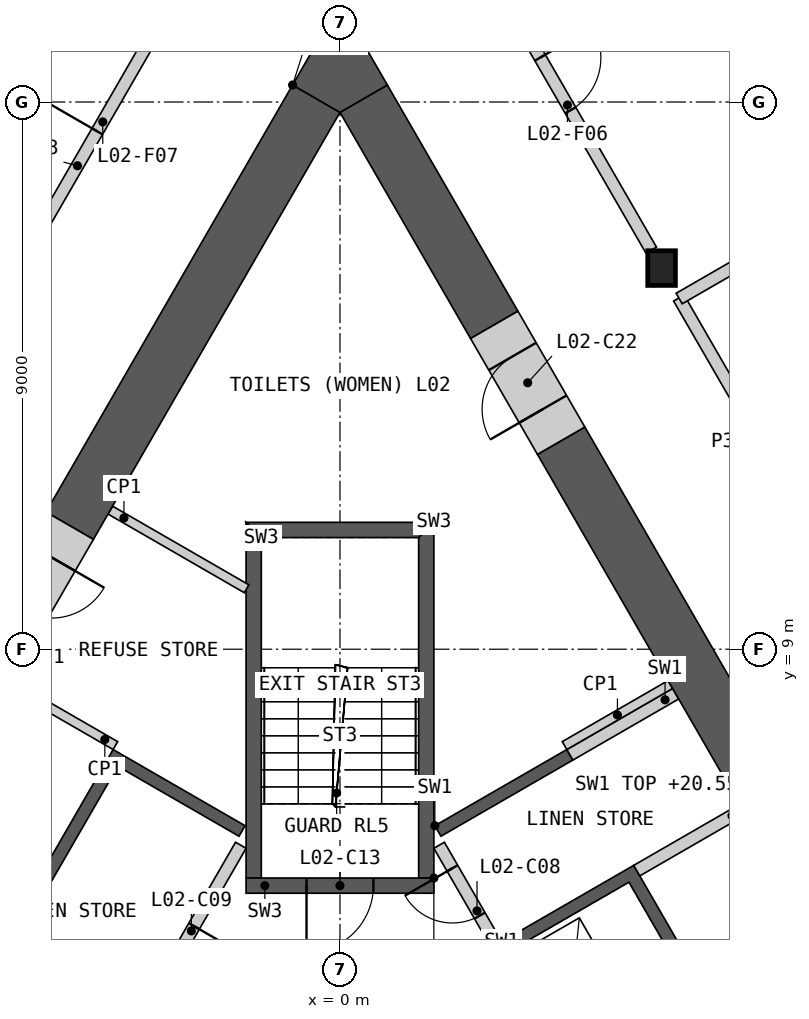
"""IFC4 building model, lengths in metres.
Left out: names, types, materials, properties, quantities, classifications, styles, units other than length and angle.
Written with IfcOpenShell. Run it as: python <this file> out.ifc"""

import sys

from ifc_helpers import new_model, si_unit, direction, frame, frame_2d, origin, origin_2d, place, context, subcontext, project, spatial, polyline, rectangle, i_section, outline, extrude, element, fill, save


model = new_model("IFC4")
c1 = context("Model", 3, precision=1e-05, world=origin(), true_north=direction((0.0, 1.0)))
c2 = subcontext(c1, "Body", "Model", "MODEL_VIEW")
j1 = project(units=[si_unit("LENGTHUNIT", "METRE"), si_unit("PLANEANGLEUNIT", "RADIAN")], contexts=[c1])
p1 = place(None, origin())
s1 = spatial("IfcSite", under=j1, at=p1, CompositionType="ELEMENT")
p2 = place(p1, origin())
s2 = spatial("IfcBuilding", under=s1, at=p2, CompositionType="ELEMENT")
p3 = place(p2, frame((0.0, 0.0, 15.5)))
s3 = spatial("IfcBuildingStorey", under=s2, at=p3, CompositionType="ELEMENT", Elevation=15.5)
p4 = place(p3, frame((5.289, 15.269, 0.0), z_axis=(0.0, 0.0, 1.0), x_axis=(1.0, 0.0, 0.0)))
e1 = element("IfcColumn", 1, at=p4, inside=s3, PredefinedType="COLUMN", context=c2, shape_type="SweptSolid", body=[
    extrude(i_section(OverallWidth=0.454, OverallDepth=0.57, WebThickness=0.078, FlangeThickness=0.125, at=origin_2d()), origin(), (0.0, 0.0, 1.0), 5.5),
])
p5 = place(p3, origin())
e2 = element("IfcWall", 2, at=p5, inside=s3, PredefinedType="SHEAR", context=c2, shape_type="SweptSolid", body=[
    extrude(outline(polyline([(1.561, 6.097), (3.731, 7.35), (3.831, 7.177), (1.66, 5.924), (1.561, 6.097)])), origin(), (0.0, 0.0, 1.0), 5.05),
])
p6 = place(p3, origin())
e3 = element("IfcWall", 3, at=p6, inside=s3, PredefinedType="SHEAR", context=c2, shape_type="SweptSolid", body=[
    extrude(outline(polyline([(2.66, 4.192), (4.831, 5.445), (8.231, -0.444), (6.061, -1.697), (5.96, -1.524), (7.952, -0.374), (6.952, 1.358), (4.96, 0.208), (4.861, 0.381), (6.852, 1.531), (5.852, 3.263), (3.861, 2.113), (3.76, 2.287), (5.752, 3.437), (4.752, 5.169), (2.76, 4.019), (2.66, 4.192)])), origin(), (0.0, 0.0, 1.0), 5.05),
])
p7 = place(p3, frame((5.817, -1.476, 0.0), z_axis=(0.0, 0.0, 1.0), x_axis=(-0.500002616675, 0.866023893041, 0.0)))
e4 = element("IfcWall", 4, at=p7, inside=s3, PredefinedType="SOLIDWALL", context=c2, shape_type="SweptSolid", body=[
    extrude(rectangle(XDim=8.373, YDim=0.2, at=frame_2d((4.187, 0.0))), origin(), (0.0, 0.0, 1.0), 5.05),
])
p8 = place(p7, frame((0.337, 0.0, 0.0)))
e5 = element("IfcOpeningElement", 5, at=p8, cuts=e4, PredefinedType="OPENING", context=c2, shape_type="SweptSolid", body=[
    extrude(rectangle(XDim=1.1, YDim=2.1, at=frame_2d((0.55, 1.05))), frame((0.0, 0.11, 0.0), z_axis=(0.0, -1.0, 0.0), x_axis=(1.0, 0.0, 0.0)), (0.0, 0.0, 1.0), 0.22),
])
p9 = place(p7, frame((2.537, 0.0, 0.0)))
e6 = element("IfcOpeningElement", 6, at=p9, cuts=e4, PredefinedType="OPENING", context=c2, shape_type="SweptSolid", body=[
    extrude(rectangle(XDim=1.1, YDim=2.1, at=frame_2d((0.55, 1.05))), frame((0.0, 0.11, 0.0), z_axis=(0.0, -1.0, 0.0), x_axis=(1.0, 0.0, 0.0)), (0.0, 0.0, 1.0), 0.22),
])
p10 = place(p7, frame((4.737, 0.0, 0.0)))
e7 = element("IfcOpeningElement", 7, at=p10, cuts=e4, PredefinedType="OPENING", context=c2, shape_type="SweptSolid", body=[
    extrude(rectangle(XDim=1.1, YDim=2.1, at=frame_2d((0.55, 1.05))), frame((0.0, 0.11, 0.0), z_axis=(0.0, -1.0, 0.0), x_axis=(1.0, 0.0, 0.0)), (0.0, 0.0, 1.0), 0.22),
])
p11 = place(p7, frame((7.037, 0.0, 0.0)))
e8 = element("IfcOpeningElement", 8, at=p11, cuts=e4, PredefinedType="OPENING", context=c2, shape_type="SweptSolid", body=[
    extrude(rectangle(XDim=0.9, YDim=2.1, at=frame_2d((0.45, 1.05))), frame((0.0, 0.11, 0.0), z_axis=(0.0, -1.0, 0.0), x_axis=(1.0, 0.0, 0.0)), (0.0, 0.0, 1.0), 0.22),
])
p12 = place(p3, frame((4.881, 5.358, 0.0), z_axis=(0.0, 0.0, 1.0), x_axis=(0.866035824272, 0.499981950752, 0.0)))
e9 = element("IfcWall", 9, at=p12, inside=s3, PredefinedType="SHEAR", context=c2, shape_type="SweptSolid", body=[
    extrude(rectangle(XDim=2.009, YDim=0.2, at=frame_2d((1.004, 0.0))), origin(), (0.0, 0.0, 1.0), 5.05),
])
p13 = place(p3, frame((3.781, 7.263, 0.0), z_axis=(0.0, 0.0, 1.0), x_axis=(0.865983199114, 0.50007309351, 0.0)))
e10 = element("IfcWall", 10, at=p13, inside=s3, PredefinedType="SHEAR", context=c2, shape_type="SweptSolid", body=[
    extrude(rectangle(XDim=2.009, YDim=0.2, at=frame_2d((1.004, 0.0))), origin(), (0.0, 0.0, 1.0), 5.05),
])
p14 = place(p3, origin())
e11 = element("IfcWall", 11, at=p14, inside=s3, PredefinedType="SHEAR", context=c2, shape_type="SweptSolid", body=[
    extrude(outline(polyline([(-4.96, 0.208), (-7.131, 1.461), (-3.731, 7.35), (-1.561, 6.097), (-1.66, 5.924), (-3.652, 7.074), (-5.752, 3.437), (-3.76, 2.287), (-3.861, 2.113), (-5.852, 3.263), (-6.852, 1.531), (-4.861, 0.381), (-4.96, 0.208)])), origin(), (0.0, 0.0, 1.0), 5.05),
])
p15 = place(p3, frame((-1.631, 5.776, 0.0), z_axis=(0.0, 0.0, 1.0), x_axis=(-0.499992876559, -0.866029516466, 0.0)))
e12 = element("IfcWall", 12, at=p15, inside=s3, PredefinedType="SOLIDWALL", context=c2, shape_type="SweptSolid", body=[
    extrude(rectangle(XDim=6.486, YDim=0.2, at=frame_2d((3.243, 0.0))), origin(), (0.0, 0.0, 1.0), 5.05),
])
p16 = place(p15, frame((1.537, 0.0, 0.0)))
e13 = element("IfcOpeningElement", 13, at=p16, cuts=e12, PredefinedType="OPENING", context=c2, shape_type="SweptSolid", body=[
    extrude(rectangle(XDim=0.9, YDim=2.1, at=frame_2d((0.45, 1.05))), frame((0.0, 0.11, 0.0), z_axis=(0.0, -1.0, 0.0), x_axis=(1.0, 0.0, 0.0)), (0.0, 0.0, 1.0), 0.22),
])
p17 = place(p3, origin())
e14 = element("IfcWall", 14, at=p17, inside=s3, PredefinedType="SHEAR", context=c2, shape_type="SweptSolid", body=[
    extrude(outline(polyline([(1.544, 5.237), (1.544, 11.087), (1.294, 10.837), (1.294, 5.237), (1.544, 5.237)])), origin(), (0.0, 0.0, 1.0), 5.05),
])
p18 = place(p3, origin())
e15 = element("IfcWall", 15, at=p18, inside=s3, PredefinedType="SHEAR", context=c2, shape_type="SweptSolid", body=[
    extrude(outline(polyline([(1.544, 11.087), (-1.544, 11.087), (-1.294, 10.837), (1.294, 10.837), (1.544, 11.087)])), origin(), (0.0, 0.0, 1.0), 5.05),
])
p19 = place(p3, origin())
e16 = element("IfcWall", 16, at=p19, inside=s3, PredefinedType="SHEAR", context=c2, shape_type="SweptSolid", body=[
    extrude(outline(polyline([(-1.294, 10.837), (-1.544, 11.087), (-1.544, 5.237), (-1.294, 5.237), (-1.294, 10.837)])), origin(), (0.0, 0.0, 1.0), 5.05),
])
p20 = place(p3, frame((1.544, 5.112, 0.0), z_axis=(0.0, 0.0, 1.0), x_axis=(-1.0, 0.0, 0.0)))
e17 = element("IfcWall", 17, at=p20, inside=s3, PredefinedType="SHEAR", context=c2, shape_type="SweptSolid", body=[
    extrude(rectangle(XDim=3.088, YDim=0.25, at=frame_2d((1.544, 0.0))), origin(), (0.0, 0.0, 1.0), 5.05),
])
p21 = place(p20, frame((0.994, 0.0, 0.0)))
e18 = element("IfcOpeningElement", 18, at=p21, cuts=e17, PredefinedType="OPENING", context=c2, shape_type="SweptSolid", body=[
    extrude(rectangle(XDim=1.1, YDim=2.1, at=frame_2d((0.55, 1.05))), frame((0.0, 0.135, 0.0), z_axis=(0.0, -1.0, 0.0), x_axis=(1.0, 0.0, 0.0)), (0.0, 0.0, 1.0), 0.27),
])
for number, where, z_axis, x_axis in (
    (19, (3.693, 7.415, 0.0), (0.0, 0.0, 1.0), (0.866, 0.5, 0.0)),
    (20, (-3.693, 7.415, 0.0), (0.0, 0.0, 1.0), (-0.866, 0.5, 0.0)),
):
    element("IfcWall", number, at=place(p3, frame(where, z_axis=z_axis, x_axis=x_axis)), inside=s3, PredefinedType="PARTITIONING", context=c2, shape_type="SweptSolid", body=[
        extrude(rectangle(XDim=2.009, YDim=0.15, at=frame_2d((1.004, 0.0))), origin(), (0.0, 0.0, 1.0), 5.05),
    ])
p22 = place(p3, frame((-3.777, 11.288, 0.0), z_axis=(0.0, 0.0, 1.0), x_axis=(0.866011223082, -0.500024560893, 0.0)))
e21 = element("IfcWall", 21, at=p22, inside=s3, PredefinedType="PARTITIONING", context=c2, shape_type="SweptSolid", body=[
    extrude(rectangle(XDim=2.588, YDim=0.15, at=frame_2d((1.294, 0.0))), origin(), (0.0, 0.0, 1.0), 5.05),
])
p23 = place(p3, frame((8.16, 4.596, 0.0), z_axis=(0.0, 0.0, 1.0), x_axis=(-0.500011374349, 0.866018836701, 0.0)))
e22 = element("IfcWall", 22, at=p23, inside=s3, PredefinedType="SHEAR", context=c2, shape_type="SweptSolid", body=[
    extrude(rectangle(XDim=9.046, YDim=0.9, at=frame_2d((4.523, 0.0))), origin(), (0.0, 0.0, 1.0), 5.05),
])
p24 = place(p3, frame((2.538, 14.335, 0.0), z_axis=(0.0, 0.0, 1.0), x_axis=(-0.500014347272, 0.866017120224, 0.0)))
e23 = element("IfcWall", 23, at=p24, inside=s3, PredefinedType="SHEAR", context=c2, shape_type="SweptSolid", body=[
    extrude(rectangle(XDim=4.296, YDim=0.9, at=frame_2d((2.148, 0.0))), origin(), (0.0, 0.0, 1.0), 5.05),
])
p25 = place(p3, frame((-0.39, 18.055, 0.0), z_axis=(0.0, 0.0, 1.0), x_axis=(-0.499995201193, -0.866028174359, 0.0)))
e24 = element("IfcWall", 24, at=p25, inside=s3, PredefinedType="SHEAR", context=c2, shape_type="SweptSolid", body=[
    extrude(rectangle(XDim=8.11, YDim=0.9, at=frame_2d((4.055, 0.0))), origin(), (0.0, 0.0, 1.0), 5.05),
])
p26 = place(p3, origin())
e25 = element("IfcWall", 25, at=p26, inside=s3, PredefinedType="SHEAR", context=c2, shape_type="SweptSolid", body=[
    extrude(outline(polyline([(-0.779, 18.28), (0.0, 19.63), (0.779, 18.28), (0.0, 17.83), (-0.779, 18.28)])), origin(), (0.0, 0.0, 1.0), 5.05),
])
p27 = place(p3, frame((-4.445, 11.031, 0.0), z_axis=(0.0, 0.0, 1.0), x_axis=(-0.50002983664, -0.866008176907, 0.0)))
e26 = element("IfcWall", 26, at=p27, inside=s3, PredefinedType="SHEAR", context=c2, shape_type="SweptSolid", body=[
    extrude(rectangle(XDim=2.2, YDim=0.9, at=frame_2d((1.1, 0.0))), origin(), (0.0, 0.0, 1.0), 5.05),
])
p28 = place(p27, frame((0.6, 0.0, 0.0)))
e27 = element("IfcOpeningElement", 27, at=p28, cuts=e26, PredefinedType="OPENING", context=c2, shape_type="SweptSolid", body=[
    extrude(rectangle(XDim=1.0, YDim=2.1, at=frame_2d((0.5, 1.05))), frame((0.0, 0.46, 0.0), z_axis=(0.0, -1.0, 0.0), x_axis=(1.0, 0.0, 0.0)), (0.0, 0.0, 1.0), 0.92),
])
p29 = place(p3, frame((3.637, 12.43, 0.0), z_axis=(0.0, 0.0, 1.0), x_axis=(-0.499994660107, 0.866028486751, 0.0)))
e28 = element("IfcWall", 28, at=p29, inside=s3, PredefinedType="SHEAR", context=c2, shape_type="SweptSolid", body=[
    extrude(rectangle(XDim=2.2, YDim=0.9, at=frame_2d((1.1, 0.0))), origin(), (0.0, 0.0, 1.0), 5.05),
])
p30 = place(p29, frame((0.6, 0.0, 0.0)))
e29 = element("IfcOpeningElement", 29, at=p30, cuts=e28, PredefinedType="OPENING", context=c2, shape_type="SweptSolid", body=[
    extrude(rectangle(XDim=1.0, YDim=2.1, at=frame_2d((0.5, 1.05))), frame((0.0, 0.46, 0.0), z_axis=(0.0, -1.0, 0.0), x_axis=(1.0, 0.0, 0.0)), (0.0, 0.0, 1.0), 0.92),
])
p31 = place(p3, frame((5.573, 14.776, 0.0), z_axis=(0.0, 0.0, 1.0), x_axis=(0.499986904098, -0.866032964575, 0.0)))
e30 = element("IfcWall", 30, at=p31, inside=s3, PredefinedType="PARTITIONING", context=c2, shape_type="SweptSolid", body=[
    extrude(rectangle(XDim=9.67, YDim=0.2, at=frame_2d((4.835, 0.0))), origin(), (0.0, 0.0, 1.0), 5.05),
])
p32 = place(p31, frame((3.985, 0.0, 0.0)))
e31 = element("IfcOpeningElement", 31, at=p32, cuts=e30, PredefinedType="OPENING", context=c2, shape_type="SweptSolid", body=[
    extrude(rectangle(XDim=1.8, YDim=2.1, at=frame_2d((0.9, 1.05))), frame((0.0, 0.11, 0.0), z_axis=(0.0, -1.0, 0.0), x_axis=(1.0, 0.0, 0.0)), (0.0, 0.0, 1.0), 0.22),
])
p33 = place(p3, frame((-5.119, 15.563, 0.0), z_axis=(0.0, 0.0, 1.0), x_axis=(0.500004801114, 0.866022631842, 0.0)))
e32 = element("IfcWall", 32, at=p33, inside=s3, PredefinedType="PARTITIONING", context=c2, shape_type="SweptSolid", body=[
    extrude(rectangle(XDim=6.412, YDim=0.2, at=frame_2d((3.206, 0.0))), origin(), (0.0, 0.0, 1.0), 5.05),
])
p34 = place(p33, frame((2.256, 0.0, 0.0)))
e33 = element("IfcOpeningElement", 33, at=p34, cuts=e32, PredefinedType="OPENING", context=c2, shape_type="SweptSolid", body=[
    extrude(rectangle(XDim=1.8, YDim=2.1, at=frame_2d((0.9, 1.05))), frame((0.0, 0.11, 0.0), z_axis=(0.0, -1.0, 0.0), x_axis=(1.0, 0.0, 0.0)), (0.0, 0.0, 1.0), 0.22),
])
p35 = place(p3, frame((1.913, 21.116, 0.0), z_axis=(0.0, 0.0, 1.0), x_axis=(0.500004801114, -0.866022631842, 0.0)))
e34 = element("IfcWall", 34, at=p35, inside=s3, PredefinedType="PARTITIONING", context=c2, shape_type="SweptSolid", body=[
    extrude(rectangle(XDim=6.412, YDim=0.2, at=frame_2d((3.206, 0.0))), origin(), (0.0, 0.0, 1.0), 5.05),
])
p36 = place(p35, frame((2.756, 0.0, 0.0)))
e35 = element("IfcOpeningElement", 35, at=p36, cuts=e34, PredefinedType="OPENING", context=c2, shape_type="SweptSolid", body=[
    extrude(rectangle(XDim=1.0, YDim=2.1, at=frame_2d((0.5, 1.05))), frame((0.0, 0.11, 0.0), z_axis=(0.0, -1.0, 0.0), x_axis=(1.0, 0.0, 0.0)), (0.0, 0.0, 1.0), 0.22),
])
p37 = place(p3, frame((5.579, 14.768, 0.0), z_axis=(0.0, 0.0, 1.0), x_axis=(0.866017018378, 0.500014523669, 0.0)))
e36 = element("IfcWall", 36, at=p37, inside=s3, PredefinedType="PARTITIONING", context=c2, shape_type="SweptSolid", body=[
    extrude(rectangle(XDim=10.082, YDim=0.2, at=frame_2d((5.041, 0.0))), origin(), (0.0, 0.0, 1.0), 5.05),
])
p38 = place(p11, origin())
e37 = element("IfcDoor", 37, at=p38, inside=s3, OperationType="SINGLE_SWING_RIGHT", PredefinedType="DOOR", context=c2, shape_type="SweptSolid", body=[
    extrude(rectangle(XDim=0.9, YDim=2.1, at=frame_2d((0.45, 1.05))), frame((0.0, 0.025, 0.0), z_axis=(0.0, -1.0, 0.0), x_axis=(1.0, 0.0, 0.0)), (0.0, 0.0, 1.0), 0.05),
])
fill(e8, e37)
p39 = place(p16, origin())
e38 = element("IfcDoor", 38, at=p39, inside=s3, OperationType="SINGLE_SWING_LEFT", PredefinedType="DOOR", context=c2, shape_type="SweptSolid", body=[
    extrude(rectangle(XDim=0.9, YDim=2.1, at=frame_2d((0.45, 1.05))), frame((0.0, 0.025, 0.0), z_axis=(0.0, -1.0, 0.0), x_axis=(1.0, 0.0, 0.0)), (0.0, 0.0, 1.0), 0.05),
])
fill(e13, e38)
p40 = place(p21, origin())
e39 = element("IfcDoor", 39, at=p40, inside=s3, OperationType="SINGLE_SWING_RIGHT", PredefinedType="DOOR", context=c2, shape_type="SweptSolid", body=[
    extrude(rectangle(XDim=1.1, YDim=2.1, at=frame_2d((0.55, 1.05))), frame((0.0, 0.025, 0.0), z_axis=(0.0, -1.0, 0.0), x_axis=(1.0, 0.0, 0.0)), (0.0, 0.0, 1.0), 0.05),
])
fill(e18, e39)
p41 = place(p28, origin())
e40 = element("IfcDoor", 40, at=p41, inside=s3, OperationType="SINGLE_SWING_LEFT", PredefinedType="DOOR", context=c2, shape_type="SweptSolid", body=[
    extrude(rectangle(XDim=1.0, YDim=2.1, at=frame_2d((0.5, 1.05))), frame((0.0, 0.205, 0.0), z_axis=(0.0, -1.0, 0.0), x_axis=(1.0, 0.0, 0.0)), (0.0, 0.0, 1.0), 0.05),
])
fill(e27, e40)
p42 = place(p30, origin())
e41 = element("IfcDoor", 41, at=p42, inside=s3, OperationType="SINGLE_SWING_LEFT", PredefinedType="DOOR", context=c2, shape_type="SweptSolid", body=[
    extrude(rectangle(XDim=1.0, YDim=2.1, at=frame_2d((0.5, 1.05))), frame((0.0, 0.205, 0.0), z_axis=(0.0, -1.0, 0.0), x_axis=(1.0, 0.0, 0.0)), (0.0, 0.0, 1.0), 0.05),
])
fill(e29, e41)
p43 = place(p36, origin())
e42 = element("IfcDoor", 42, at=p43, inside=s3, OperationType="SINGLE_SWING_LEFT", PredefinedType="DOOR", context=c2, shape_type="SweptSolid", body=[
    extrude(rectangle(XDim=1.0, YDim=2.1, at=frame_2d((0.5, 1.05))), frame((0.0, 0.025, 0.0), z_axis=(0.0, -1.0, 0.0), x_axis=(1.0, 0.0, 0.0)), (0.0, 0.0, 1.0), 0.05),
])
fill(e35, e42)
p44 = place(p34, origin())
e43 = element("IfcDoor", 43, at=p44, inside=s3, OperationType="DOUBLE_DOOR_SINGLE_SWING", PredefinedType="DOOR", context=c2, shape_type="SweptSolid", body=[
    extrude(rectangle(XDim=1.8, YDim=2.1, at=frame_2d((0.9, 1.05))), frame((0.0, 0.025, 0.0), z_axis=(0.0, -1.0, 0.0), x_axis=(1.0, 0.0, 0.0)), (0.0, 0.0, 1.0), 0.05),
])
fill(e33, e43)
save(model, sys.argv[1])
